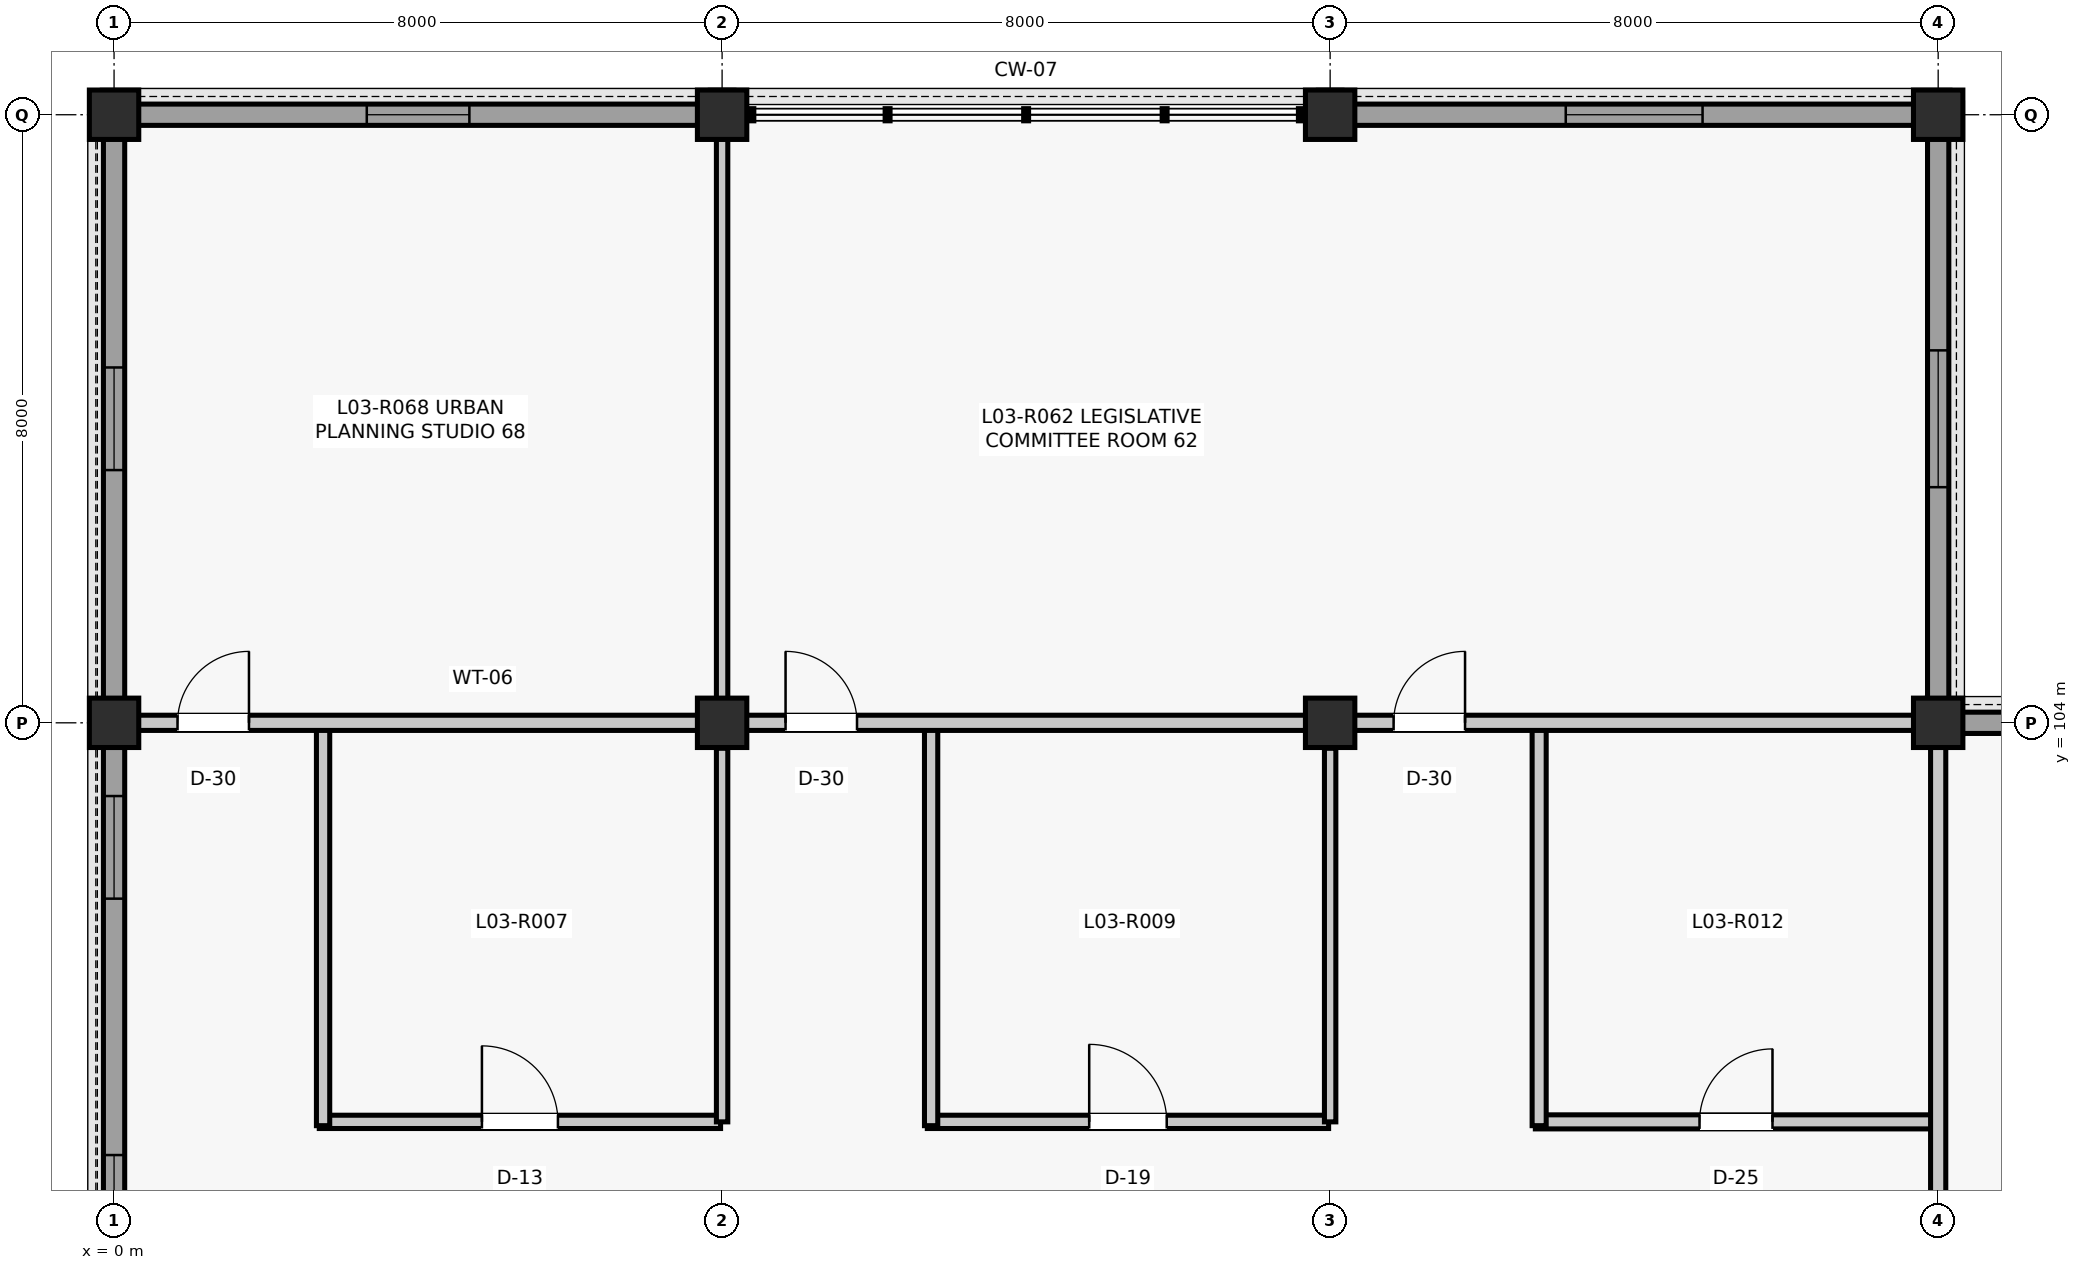
"""IFC4 building model, lengths in metres.
Left out: names, types, materials, properties, quantities, classifications, styles, units other than length and angle.
Written with IfcOpenShell. Run it as: python <this file> out.ifc"""

import sys

from ifc_helpers import new_model, si_unit, direction, frame, frame_2d, origin, origin_2d, place, context, subcontext, project, spatial, rectangle, extrude, element, fill, save


model = new_model("IFC4")
c1 = context("Model", 3, precision=1e-05, world=origin(), true_north=direction((0.0, 1.0)))
c2 = subcontext(c1, "Body", "Model", "MODEL_VIEW")
j1 = project(units=[si_unit("LENGTHUNIT", "METRE"), si_unit("PLANEANGLEUNIT", "RADIAN")], contexts=[c1])
p1 = place(None, origin())
s1 = spatial("IfcSite", under=j1, at=p1, CompositionType="ELEMENT")
p2 = place(p1, origin())
s2 = spatial("IfcBuilding", under=s1, at=p2, CompositionType="ELEMENT")
p3 = place(p2, frame((0.0, 0.0, 13.86)))
s3 = spatial("IfcBuildingStorey", under=s2, at=p3, CompositionType="ELEMENT", Elevation=13.86)
for number, where, z_axis, x_axis in (
    (1, (0.0, 104.0, 0.0), (0.0, 0.0, 1.0), (1.0, 0.0, 0.0)),
    (2, (0.0, 112.0, 0.0), (0.0, 0.0, 1.0), (1.0, 0.0, 0.0)),
    (3, (8.0, 104.0, 0.0), (0.0, 0.0, 1.0), (1.0, 0.0, 0.0)),
    (4, (8.0, 112.0, 0.0), (0.0, 0.0, 1.0), (1.0, 0.0, 0.0)),
    (5, (16.0, 104.0, 0.0), (0.0, 0.0, 1.0), (1.0, 0.0, 0.0)),
    (6, (16.0, 112.0, 0.0), (0.0, 0.0, 1.0), (1.0, 0.0, 0.0)),
    (7, (24.0, 104.0, 0.0), (0.0, 0.0, 1.0), (1.0, 0.0, 0.0)),
    (8, (24.0, 112.0, 0.0), (0.0, 0.0, 1.0), (1.0, 0.0, 0.0)),
):
    element("IfcColumn", number, at=place(p3, frame(where, z_axis=z_axis, x_axis=x_axis)), inside=s3, PredefinedType="COLUMN", context=c2, shape_type="SweptSolid", body=[
        extrude(rectangle(XDim=0.65, YDim=0.65, at=origin_2d()), origin(), (0.0, 0.0, 1.0), 3.96),
    ])
p4 = place(p3, frame((0.0, 96.31, 0.0), z_axis=(0.0, 0.0, 1.0), x_axis=(0.0, 1.0, 0.0)))
e9 = element("IfcWall", 9, at=p4, inside=s3, PredefinedType="SOLIDWALL", context=c2, shape_type="SweptSolid", body=[
    extrude(rectangle(XDim=7.38, YDim=0.28, at=frame_2d((3.69, 0.0))), origin(), (0.0, 0.0, 1.0), 3.367),
])
p5 = place(p4, frame((0.653, 0.0, 0.95)))
e10 = element("IfcOpeningElement", 10, at=p5, cuts=e9, PredefinedType="OPENING", context=c2, shape_type="SweptSolid", body=[
    extrude(rectangle(XDim=1.35, YDim=1.9, at=frame_2d((0.675, 0.95))), frame((0.0, 0.15, 0.0), z_axis=(0.0, -1.0, 0.0), x_axis=(1.0, 0.0, 0.0)), (0.0, 0.0, 1.0), 0.3),
])
p6 = place(p4, frame((5.377, 0.0, 0.95)))
e11 = element("IfcOpeningElement", 11, at=p6, cuts=e9, PredefinedType="OPENING", context=c2, shape_type="SweptSolid", body=[
    extrude(rectangle(XDim=1.35, YDim=1.9, at=frame_2d((0.675, 0.95))), frame((0.0, 0.15, 0.0), z_axis=(0.0, -1.0, 0.0), x_axis=(1.0, 0.0, 0.0)), (0.0, 0.0, 1.0), 0.3),
])
p7 = place(p3, frame((0.31, 112.0, 0.0), z_axis=(0.0, 0.0, 1.0), x_axis=(1.0, 0.0, 0.0)))
e12 = element("IfcWall", 12, at=p7, inside=s3, PredefinedType="SOLIDWALL", context=c2, shape_type="SweptSolid", body=[
    extrude(rectangle(XDim=7.38, YDim=0.28, at=frame_2d((3.69, 0.0))), origin(), (0.0, 0.0, 1.0), 3.364),
])
p8 = place(p7, frame((3.015, 0.0, 0.9)))
e13 = element("IfcOpeningElement", 13, at=p8, cuts=e12, PredefinedType="OPENING", context=c2, shape_type="SweptSolid", body=[
    extrude(rectangle(XDim=1.35, YDim=1.9, at=frame_2d((0.675, 0.95))), frame((0.0, 0.15, 0.0), z_axis=(0.0, -1.0, 0.0), x_axis=(1.0, 0.0, 0.0)), (0.0, 0.0, 1.0), 0.3),
])
p9 = place(p3, frame((0.0, 104.31, 0.0), z_axis=(0.0, 0.0, 1.0), x_axis=(0.0, 1.0, 0.0)))
e14 = element("IfcWall", 14, at=p9, inside=s3, PredefinedType="SOLIDWALL", context=c2, shape_type="SweptSolid", body=[
    extrude(rectangle(XDim=7.38, YDim=0.28, at=frame_2d((3.69, 0.0))), origin(), (0.0, 0.0, 1.0), 3.3),
])
p10 = place(p9, frame((3.015, 0.0, 0.9)))
e15 = element("IfcOpeningElement", 15, at=p10, cuts=e14, PredefinedType="OPENING", context=c2, shape_type="SweptSolid", body=[
    extrude(rectangle(XDim=1.35, YDim=1.9, at=frame_2d((0.675, 0.95))), frame((0.0, 0.15, 0.0), z_axis=(0.0, -1.0, 0.0), x_axis=(1.0, 0.0, 0.0)), (0.0, 0.0, 1.0), 0.3),
])
p11 = place(p3, frame((16.31, 112.0, 0.0), z_axis=(0.0, 0.0, 1.0), x_axis=(1.0, 0.0, 0.0)))
e16 = element("IfcWall", 16, at=p11, inside=s3, PredefinedType="SOLIDWALL", context=c2, shape_type="SweptSolid", body=[
    extrude(rectangle(XDim=7.38, YDim=0.28, at=frame_2d((3.69, 0.0))), origin(), (0.0, 0.0, 1.0), 3.367),
])
p12 = place(p11, frame((2.79, 0.0, 1.35)))
e17 = element("IfcOpeningElement", 17, at=p12, cuts=e16, PredefinedType="OPENING", context=c2, shape_type="SweptSolid", body=[
    extrude(rectangle(XDim=1.8, YDim=1.2, at=frame_2d((0.9, 0.6))), frame((0.0, 0.15, 0.0), z_axis=(0.0, -1.0, 0.0), x_axis=(1.0, 0.0, 0.0)), (0.0, 0.0, 1.0), 0.3),
])
p13 = place(p3, frame((24.0, 104.31, 0.0), z_axis=(0.0, 0.0, 1.0), x_axis=(0.0, 1.0, 0.0)))
e18 = element("IfcWall", 18, at=p13, inside=s3, PredefinedType="SOLIDWALL", context=c2, shape_type="SweptSolid", body=[
    extrude(rectangle(XDim=7.38, YDim=0.28, at=frame_2d((3.69, 0.0))), origin(), (0.0, 0.0, 1.0), 3.367),
])
p14 = place(p13, frame((2.79, 0.0, 1.35)))
e19 = element("IfcOpeningElement", 19, at=p14, cuts=e18, PredefinedType="OPENING", context=c2, shape_type="SweptSolid", body=[
    extrude(rectangle(XDim=1.8, YDim=1.2, at=frame_2d((0.9, 0.6))), frame((0.0, 0.15, 0.0), z_axis=(0.0, -1.0, 0.0), x_axis=(1.0, 0.0, 0.0)), (0.0, 0.0, 1.0), 0.3),
])
p15 = place(p3, frame((24.31, 104.0, 0.0), z_axis=(0.0, 0.0, 1.0), x_axis=(1.0, 0.0, 0.0)))
e20 = element("IfcWall", 20, at=p15, inside=s3, PredefinedType="SOLIDWALL", context=c2, shape_type="SweptSolid", body=[
    extrude(rectangle(XDim=7.355, YDim=0.28, at=frame_2d((3.677, 0.0))), origin(), (0.0, 0.0, 1.0), 3.367),
])
p16 = place(p15, frame((2.778, 0.0, 1.35)))
e21 = element("IfcOpeningElement", 21, at=p16, cuts=e20, PredefinedType="OPENING", context=c2, shape_type="SweptSolid", body=[
    extrude(rectangle(XDim=1.8, YDim=1.2, at=frame_2d((0.9, 0.6))), frame((0.0, 0.15, 0.0), z_axis=(0.0, -1.0, 0.0), x_axis=(1.0, 0.0, 0.0)), (0.0, 0.0, 1.0), 0.3),
])
p17 = place(p3, frame((2.7, 98.75, 0.0), z_axis=(0.0, 0.0, 1.0), x_axis=(1.0, 0.0, 0.0)))
e22 = element("IfcWall", 22, at=p17, inside=s3, PredefinedType="PARTITIONING", context=c2, shape_type="SweptSolid", body=[
    extrude(rectangle(XDim=5.28, YDim=0.175, at=frame_2d((2.64, 0.0))), origin(), (0.0, 0.0, 1.0), 3.253),
])
p18 = place(p17, frame((2.14, 0.0, 0.0)))
e23 = element("IfcOpeningElement", 23, at=p18, cuts=e22, PredefinedType="OPENING", context=c2, shape_type="SweptSolid", body=[
    extrude(rectangle(XDim=1.0, YDim=2.15, at=frame_2d((0.5, 1.075))), frame((0.0, 0.097, 0.0), z_axis=(0.0, -1.0, 0.0), x_axis=(1.0, 0.0, 0.0)), (0.0, 0.0, 1.0), 0.195),
])
p19 = place(p3, frame((2.75, 98.7, 0.0), z_axis=(0.0, 0.0, 1.0), x_axis=(0.0, 1.0, 0.0)))
e24 = element("IfcWall", 24, at=p19, inside=s3, PredefinedType="PARTITIONING", context=c2, shape_type="SweptSolid", body=[
    extrude(rectangle(XDim=5.28, YDim=0.175, at=frame_2d((2.64, 0.0))), origin(), (0.0, 0.0, 1.0), 3.253),
])
p20 = place(p3, frame((8.0, 98.75, 0.0), z_axis=(0.0, 0.0, 1.0), x_axis=(0.0, 1.0, 0.0)))
e25 = element("IfcWall", 25, at=p20, inside=s3, PredefinedType="PARTITIONING", context=c2, shape_type="SweptSolid", body=[
    extrude(rectangle(XDim=4.915, YDim=0.15, at=frame_2d((2.458, 0.0))), origin(), (0.0, 0.0, 1.0), 3.253),
])
p21 = place(p3, frame((10.7, 98.75, 0.0), z_axis=(0.0, 0.0, 1.0), x_axis=(1.0, 0.0, 0.0)))
e26 = element("IfcWall", 26, at=p21, inside=s3, PredefinedType="PARTITIONING", context=c2, shape_type="SweptSolid", body=[
    extrude(rectangle(XDim=5.28, YDim=0.175, at=frame_2d((2.64, 0.0))), origin(), (0.0, 0.0, 1.0), 3.358),
])
p22 = place(p21, frame((2.13, 0.0, 0.0)))
e27 = element("IfcOpeningElement", 27, at=p22, cuts=e26, PredefinedType="OPENING", context=c2, shape_type="SweptSolid", body=[
    extrude(rectangle(XDim=1.02, YDim=2.2, at=frame_2d((0.51, 1.1))), frame((0.0, 0.097, 0.0), z_axis=(0.0, -1.0, 0.0), x_axis=(1.0, 0.0, 0.0)), (0.0, 0.0, 1.0), 0.195),
])
p23 = place(p3, frame((10.75, 98.7, 0.0), z_axis=(0.0, 0.0, 1.0), x_axis=(0.0, 1.0, 0.0)))
e28 = element("IfcWall", 28, at=p23, inside=s3, PredefinedType="PARTITIONING", context=c2, shape_type="SweptSolid", body=[
    extrude(rectangle(XDim=5.28, YDim=0.175, at=frame_2d((2.64, 0.0))), origin(), (0.0, 0.0, 1.0), 3.241),
])
p24 = place(p3, frame((16.0, 98.75, 0.0), z_axis=(0.0, 0.0, 1.0), x_axis=(0.0, 1.0, 0.0)))
e29 = element("IfcWall", 29, at=p24, inside=s3, PredefinedType="PARTITIONING", context=c2, shape_type="SweptSolid", body=[
    extrude(rectangle(XDim=4.915, YDim=0.15, at=frame_2d((2.458, 0.0))), origin(), (0.0, 0.0, 1.0), 3.452),
])
p25 = place(p3, frame((18.7, 98.75, 0.0), z_axis=(0.0, 0.0, 1.0), x_axis=(1.0, 0.0, 0.0)))
e30 = element("IfcWall", 30, at=p25, inside=s3, PredefinedType="PARTITIONING", context=c2, shape_type="SweptSolid", body=[
    extrude(rectangle(XDim=5.28, YDim=0.185, at=frame_2d((2.64, 0.0))), origin(), (0.0, 0.0, 1.0), 3.247),
])
p26 = place(p25, frame((2.16, 0.0, 0.0)))
e31 = element("IfcOpeningElement", 31, at=p26, cuts=e30, PredefinedType="OPENING", context=c2, shape_type="SweptSolid", body=[
    extrude(rectangle(XDim=0.96, YDim=2.14, at=frame_2d((0.48, 1.07))), frame((0.0, 0.103, 0.0), z_axis=(0.0, -1.0, 0.0), x_axis=(1.0, 0.0, 0.0)), (0.0, 0.0, 1.0), 0.205),
])
p27 = place(p3, frame((18.75, 98.7, 0.0), z_axis=(0.0, 0.0, 1.0), x_axis=(0.0, 1.0, 0.0)))
e32 = element("IfcWall", 32, at=p27, inside=s3, PredefinedType="PARTITIONING", context=c2, shape_type="SweptSolid", body=[
    extrude(rectangle(XDim=5.28, YDim=0.185, at=frame_2d((2.64, 0.0))), origin(), (0.0, 0.0, 1.0), 3.392),
])
p28 = place(p3, frame((0.315, 104.0, 0.0), z_axis=(0.0, 0.0, 1.0), x_axis=(1.0, 0.0, 0.0)))
e33 = element("IfcWall", 33, at=p28, inside=s3, PredefinedType="PARTITIONING", context=c2, shape_type="SweptSolid", body=[
    extrude(rectangle(XDim=7.37, YDim=0.2, at=frame_2d((3.685, 0.0))), origin(), (0.0, 0.0, 1.0), 3.253),
])
p29 = place(p28, frame((0.52, 0.0, 0.0)))
e34 = element("IfcOpeningElement", 34, at=p29, cuts=e33, PredefinedType="OPENING", context=c2, shape_type="SweptSolid", body=[
    extrude(rectangle(XDim=0.94, YDim=2.12, at=frame_2d((0.47, 1.06))), frame((0.0, 0.11, 0.0), z_axis=(0.0, -1.0, 0.0), x_axis=(1.0, 0.0, 0.0)), (0.0, 0.0, 1.0), 0.22),
])
p30 = place(p3, frame((8.0, 104.315, 0.0), z_axis=(0.0, 0.0, 1.0), x_axis=(0.0, 1.0, 0.0)))
e35 = element("IfcWall", 35, at=p30, inside=s3, PredefinedType="PARTITIONING", context=c2, shape_type="SweptSolid", body=[
    extrude(rectangle(XDim=7.37, YDim=0.15, at=frame_2d((3.685, 0.0))), origin(), (0.0, 0.0, 1.0), 3.452),
])
p31 = place(p3, frame((8.315, 104.0, 0.0), z_axis=(0.0, 0.0, 1.0), x_axis=(1.0, 0.0, 0.0)))
e36 = element("IfcWall", 36, at=p31, inside=s3, PredefinedType="PARTITIONING", context=c2, shape_type="SweptSolid", body=[
    extrude(rectangle(XDim=7.37, YDim=0.2, at=frame_2d((3.685, 0.0))), origin(), (0.0, 0.0, 1.0), 3.241),
])
p32 = place(p31, frame((0.52, 0.0, 0.0)))
e37 = element("IfcOpeningElement", 37, at=p32, cuts=e36, PredefinedType="OPENING", context=c2, shape_type="SweptSolid", body=[
    extrude(rectangle(XDim=0.94, YDim=2.12, at=frame_2d((0.47, 1.06))), frame((0.0, 0.11, 0.0), z_axis=(0.0, -1.0, 0.0), x_axis=(1.0, 0.0, 0.0)), (0.0, 0.0, 1.0), 0.22),
])
p33 = place(p3, frame((24.0, 96.315, 0.0), z_axis=(0.0, 0.0, 1.0), x_axis=(0.0, 1.0, 0.0)))
e38 = element("IfcWall", 38, at=p33, inside=s3, PredefinedType="PARTITIONING", context=c2, shape_type="SweptSolid", body=[
    extrude(rectangle(XDim=7.37, YDim=0.2, at=frame_2d((3.685, 0.0))), origin(), (0.0, 0.0, 1.0), 3.247),
])
p34 = place(p33, frame((0.52, 0.0, 0.0)))
e39 = element("IfcOpeningElement", 39, at=p34, cuts=e38, PredefinedType="OPENING", context=c2, shape_type="SweptSolid", body=[
    extrude(rectangle(XDim=0.94, YDim=2.12, at=frame_2d((0.47, 1.06))), frame((0.0, 0.11, 0.0), z_axis=(0.0, -1.0, 0.0), x_axis=(1.0, 0.0, 0.0)), (0.0, 0.0, 1.0), 0.22),
])
p35 = place(p3, frame((16.315, 104.0, 0.0), z_axis=(0.0, 0.0, 1.0), x_axis=(1.0, 0.0, 0.0)))
e40 = element("IfcWall", 40, at=p35, inside=s3, PredefinedType="PARTITIONING", context=c2, shape_type="SweptSolid", body=[
    extrude(rectangle(XDim=7.37, YDim=0.2, at=frame_2d((3.685, 0.0))), origin(), (0.0, 0.0, 1.0), 3.452),
])
p36 = place(p35, frame((0.52, 0.0, 0.0)))
e41 = element("IfcOpeningElement", 41, at=p36, cuts=e40, PredefinedType="OPENING", context=c2, shape_type="SweptSolid", body=[
    extrude(rectangle(XDim=0.94, YDim=2.12, at=frame_2d((0.47, 1.06))), frame((0.0, 0.11, 0.0), z_axis=(0.0, -1.0, 0.0), x_axis=(1.0, 0.0, 0.0)), (0.0, 0.0, 1.0), 0.22),
])
p37 = place(p5, origin())
e42 = element("IfcWindow", 42, at=p37, inside=s3, PartitioningType="SINGLE_PANEL", PredefinedType="WINDOW", context=c2, shape_type="SweptSolid", body=[
    extrude(rectangle(XDim=1.35, YDim=1.9, at=frame_2d((0.675, 0.95))), frame((0.0, 0.03, 0.0), z_axis=(0.0, -1.0, 0.0), x_axis=(1.0, 0.0, 0.0)), (0.0, 0.0, 1.0), 0.06),
])
fill(e10, e42)
p38 = place(p6, origin())
e43 = element("IfcWindow", 43, at=p38, inside=s3, PartitioningType="SINGLE_PANEL", PredefinedType="WINDOW", context=c2, shape_type="SweptSolid", body=[
    extrude(rectangle(XDim=1.35, YDim=1.9, at=frame_2d((0.675, 0.95))), frame((0.0, 0.03, 0.0), z_axis=(0.0, -1.0, 0.0), x_axis=(1.0, 0.0, 0.0)), (0.0, 0.0, 1.0), 0.06),
])
fill(e11, e43)
p39 = place(p8, origin())
e44 = element("IfcWindow", 44, at=p39, inside=s3, PartitioningType="SINGLE_PANEL", PredefinedType="WINDOW", context=c2, shape_type="SweptSolid", body=[
    extrude(rectangle(XDim=1.35, YDim=1.9, at=frame_2d((0.675, 0.95))), frame((0.0, 0.03, 0.0), z_axis=(0.0, -1.0, 0.0), x_axis=(1.0, 0.0, 0.0)), (0.0, 0.0, 1.0), 0.06),
])
fill(e13, e44)
p40 = place(p10, origin())
e45 = element("IfcWindow", 45, at=p40, inside=s3, PartitioningType="SINGLE_PANEL", PredefinedType="WINDOW", context=c2, shape_type="SweptSolid", body=[
    extrude(rectangle(XDim=1.35, YDim=1.9, at=frame_2d((0.675, 0.95))), frame((0.0, 0.03, 0.0), z_axis=(0.0, -1.0, 0.0), x_axis=(1.0, 0.0, 0.0)), (0.0, 0.0, 1.0), 0.06),
])
fill(e15, e45)
p41 = place(p12, origin())
e46 = element("IfcWindow", 46, at=p41, inside=s3, PartitioningType="SINGLE_PANEL", PredefinedType="WINDOW", context=c2, shape_type="SweptSolid", body=[
    extrude(rectangle(XDim=1.8, YDim=1.2, at=frame_2d((0.9, 0.6))), frame((0.0, 0.03, 0.0), z_axis=(0.0, -1.0, 0.0), x_axis=(1.0, 0.0, 0.0)), (0.0, 0.0, 1.0), 0.06),
])
fill(e17, e46)
p42 = place(p14, origin())
e47 = element("IfcWindow", 47, at=p42, inside=s3, PartitioningType="SINGLE_PANEL", PredefinedType="WINDOW", context=c2, shape_type="SweptSolid", body=[
    extrude(rectangle(XDim=1.8, YDim=1.2, at=frame_2d((0.9, 0.6))), frame((0.0, 0.03, 0.0), z_axis=(0.0, -1.0, 0.0), x_axis=(1.0, 0.0, 0.0)), (0.0, 0.0, 1.0), 0.06),
])
fill(e19, e47)
p43 = place(p18, origin())
e48 = element("IfcDoor", 48, at=p43, inside=s3, OperationType="SINGLE_SWING_LEFT", PredefinedType="DOOR", context=c2, shape_type="SweptSolid", body=[
    extrude(rectangle(XDim=1.0, YDim=2.15, at=frame_2d((0.5, 1.075))), frame((0.0, 0.025, 0.0), z_axis=(0.0, -1.0, 0.0), x_axis=(1.0, 0.0, 0.0)), (0.0, 0.0, 1.0), 0.05),
])
fill(e23, e48)
p44 = place(p22, origin())
e49 = element("IfcDoor", 49, at=p44, inside=s3, OperationType="SINGLE_SWING_LEFT", PredefinedType="DOOR", context=c2, shape_type="SweptSolid", body=[
    extrude(rectangle(XDim=1.02, YDim=2.2, at=frame_2d((0.51, 1.1))), frame((0.0, 0.025, 0.0), z_axis=(0.0, -1.0, 0.0), x_axis=(1.0, 0.0, 0.0)), (0.0, 0.0, 1.0), 0.05),
])
fill(e27, e49)
p45 = place(p26, origin())
e50 = element("IfcDoor", 50, at=p45, inside=s3, OperationType="SINGLE_SWING_RIGHT", PredefinedType="DOOR", context=c2, shape_type="SweptSolid", body=[
    extrude(rectangle(XDim=0.96, YDim=2.14, at=frame_2d((0.48, 1.07))), frame((0.0, 0.025, 0.0), z_axis=(0.0, -1.0, 0.0), x_axis=(1.0, 0.0, 0.0)), (0.0, 0.0, 1.0), 0.05),
])
fill(e31, e50)
p46 = place(p29, origin())
e51 = element("IfcDoor", 51, at=p46, inside=s3, OperationType="SINGLE_SWING_RIGHT", PredefinedType="DOOR", context=c2, shape_type="SweptSolid", body=[
    extrude(rectangle(XDim=0.94, YDim=2.12, at=frame_2d((0.47, 1.06))), frame((0.0, 0.025, 0.0), z_axis=(0.0, -1.0, 0.0), x_axis=(1.0, 0.0, 0.0)), (0.0, 0.0, 1.0), 0.05),
])
fill(e34, e51)
p47 = place(p32, origin())
e52 = element("IfcDoor", 52, at=p47, inside=s3, OperationType="SINGLE_SWING_LEFT", PredefinedType="DOOR", context=c2, shape_type="SweptSolid", body=[
    extrude(rectangle(XDim=0.94, YDim=2.12, at=frame_2d((0.47, 1.06))), frame((0.0, 0.025, 0.0), z_axis=(0.0, -1.0, 0.0), x_axis=(1.0, 0.0, 0.0)), (0.0, 0.0, 1.0), 0.05),
])
fill(e37, e52)
p48 = place(p36, origin())
e53 = element("IfcDoor", 53, at=p48, inside=s3, OperationType="SINGLE_SWING_RIGHT", PredefinedType="DOOR", context=c2, shape_type="SweptSolid", body=[
    extrude(rectangle(XDim=0.94, YDim=2.12, at=frame_2d((0.47, 1.06))), frame((0.0, 0.025, 0.0), z_axis=(0.0, -1.0, 0.0), x_axis=(1.0, 0.0, 0.0)), (0.0, 0.0, 1.0), 0.05),
])
fill(e41, e53)
save(model, sys.argv[1])
